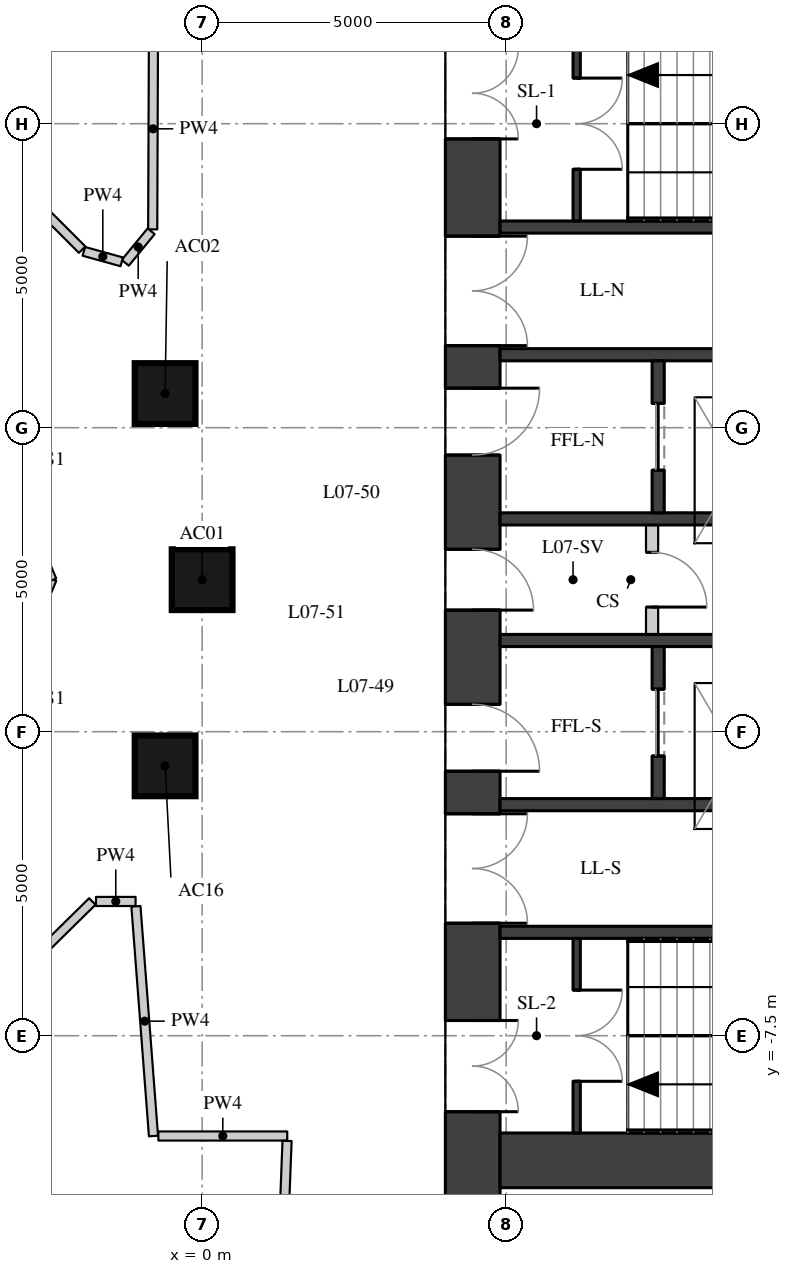
"""IFC4 building model, lengths in metres.
Left out: names, types, materials, properties, quantities, classifications, styles, units other than length and angle.
Written with IfcOpenShell. Run it as: python <this file> out.ifc"""

import sys

from ifc_helpers import new_model, si_unit, direction, frame, frame_2d, origin, origin_2d, place, context, subcontext, project, spatial, rectangle, extrude, element, fill, save


model = new_model("IFC4")
c1 = context("Model", 3, precision=1e-05, world=origin(), true_north=direction((0.0, 1.0)))
c2 = subcontext(c1, "Body", "Model", "MODEL_VIEW")
j1 = project(units=[si_unit("LENGTHUNIT", "METRE"), si_unit("PLANEANGLEUNIT", "RADIAN")], contexts=[c1])
p1 = place(None, origin())
s1 = spatial("IfcSite", under=j1, at=p1, CompositionType="ELEMENT")
p2 = place(p1, origin())
s2 = spatial("IfcBuilding", under=s1, at=p2, CompositionType="ELEMENT")
p3 = place(p2, frame((0.0, 0.0, 31.6)))
s3 = spatial("IfcBuildingStorey", under=s2, at=p3, CompositionType="ELEMENT", Elevation=31.6)
for number, where, z_axis, x_axis in (
    (1, (0.0, 0.0, 0.0), (0.0, 0.0, 1.0), (1.0, 0.0, 0.0)),
    (2, (-0.609, 3.062, 0.0), (0.0, 0.0, 1.0), (1.0, 0.0, 0.0)),
    (3, (-0.609, -3.062, 0.0), (0.0, 0.0, 1.0), (1.0, 0.0, 0.0)),
):
    element("IfcColumn", number, at=place(p3, frame(where, z_axis=z_axis, x_axis=x_axis)), inside=s3, PredefinedType="COLUMN", context=c2, shape_type="SweptSolid", body=[
        extrude(rectangle(XDim=1.0, YDim=1.0, at=origin_2d()), origin(), (0.0, 0.0, 1.0), 3.3),
    ])
p4 = place(p3, frame((4.45, -11.1, 0.0), z_axis=(0.0, 0.0, 1.0), x_axis=(0.0, 1.0, 0.0)))
e4 = element("IfcWall", 4, at=p4, inside=s3, PredefinedType="SHEAR", context=c2, shape_type="SweptSolid", body=[
    extrude(rectangle(XDim=22.2, YDim=0.9, at=frame_2d((11.1, 0.0))), origin(), (0.0, 0.0, 1.0), 3.02),
])
p5 = place(p4, frame((2.35, 0.0, 0.0)))
e5 = element("IfcOpeningElement", 5, at=p5, cuts=e4, PredefinedType="OPENING", context=c2, shape_type="SweptSolid", body=[
    extrude(rectangle(XDim=1.5, YDim=2.1, at=frame_2d((0.75, 1.05))), frame((0.0, 0.46, 0.0), z_axis=(0.0, -1.0, 0.0), x_axis=(1.0, 0.0, 0.0)), (0.0, 0.0, 1.0), 0.92),
])
p6 = place(p4, frame((5.45, 0.0, 0.0)))
e6 = element("IfcOpeningElement", 6, at=p6, cuts=e4, PredefinedType="OPENING", context=c2, shape_type="SweptSolid", body=[
    extrude(rectangle(XDim=1.8, YDim=2.1, at=frame_2d((0.9, 1.05))), frame((0.0, 0.46, 0.0), z_axis=(0.0, -1.0, 0.0), x_axis=(1.0, 0.0, 0.0)), (0.0, 0.0, 1.0), 0.92),
])
p7 = place(p4, frame((7.95, 0.0, 0.0)))
e7 = element("IfcOpeningElement", 7, at=p7, cuts=e4, PredefinedType="OPENING", context=c2, shape_type="SweptSolid", body=[
    extrude(rectangle(XDim=1.1, YDim=2.1, at=frame_2d((0.55, 1.05))), frame((0.0, 0.46, 0.0), z_axis=(0.0, -1.0, 0.0), x_axis=(1.0, 0.0, 0.0)), (0.0, 0.0, 1.0), 0.92),
])
p8 = place(p4, frame((10.6, 0.0, 0.0)))
e8 = element("IfcOpeningElement", 8, at=p8, cuts=e4, PredefinedType="OPENING", context=c2, shape_type="SweptSolid", body=[
    extrude(rectangle(XDim=1.0, YDim=2.1, at=frame_2d((0.5, 1.05))), frame((0.0, 0.46, 0.0), z_axis=(0.0, -1.0, 0.0), x_axis=(1.0, 0.0, 0.0)), (0.0, 0.0, 1.0), 0.92),
])
p9 = place(p4, frame((13.15, 0.0, 0.0)))
e9 = element("IfcOpeningElement", 9, at=p9, cuts=e4, PredefinedType="OPENING", context=c2, shape_type="SweptSolid", body=[
    extrude(rectangle(XDim=1.1, YDim=2.1, at=frame_2d((0.55, 1.05))), frame((0.0, 0.46, 0.0), z_axis=(0.0, -1.0, 0.0), x_axis=(1.0, 0.0, 0.0)), (0.0, 0.0, 1.0), 0.92),
])
p10 = place(p4, frame((14.95, 0.0, 0.0)))
e10 = element("IfcOpeningElement", 10, at=p10, cuts=e4, PredefinedType="OPENING", context=c2, shape_type="SweptSolid", body=[
    extrude(rectangle(XDim=1.8, YDim=2.1, at=frame_2d((0.9, 1.05))), frame((0.0, 0.46, 0.0), z_axis=(0.0, -1.0, 0.0), x_axis=(1.0, 0.0, 0.0)), (0.0, 0.0, 1.0), 0.92),
])
p11 = place(p4, frame((18.35, 0.0, 0.0)))
e11 = element("IfcOpeningElement", 11, at=p11, cuts=e4, PredefinedType="OPENING", context=c2, shape_type="SweptSolid", body=[
    extrude(rectangle(XDim=1.5, YDim=2.1, at=frame_2d((0.75, 1.05))), frame((0.0, 0.46, 0.0), z_axis=(0.0, -1.0, 0.0), x_axis=(1.0, 0.0, 0.0)), (0.0, 0.0, 1.0), 0.92),
])
p12 = place(p3, frame((4.9, -9.55, 0.0), z_axis=(0.0, 0.0, 1.0), x_axis=(1.0, 0.0, 0.0)))
e12 = element("IfcWall", 12, at=p12, inside=s3, PredefinedType="SHEAR", context=c2, shape_type="SweptSolid", body=[
    extrude(rectangle(XDim=10.2, YDim=0.9, at=frame_2d((5.1, 0.0))), origin(), (0.0, 0.0, 1.0), 3.02),
])
p13 = place(p3, frame((4.9, 5.8, 0.0), z_axis=(0.0, 0.0, 1.0), x_axis=(1.0, 0.0, 0.0)))
e13 = element("IfcWall", 13, at=p13, inside=s3, PredefinedType="SHEAR", context=c2, shape_type="SweptSolid", body=[
    extrude(rectangle(XDim=10.2, YDim=0.2, at=frame_2d((5.1, 0.0))), origin(), (0.0, 0.0, 1.0), 3.02),
])
p14 = place(p13, frame((6.75, 0.0, 0.0)))
e14 = element("IfcOpeningElement", 14, at=p14, cuts=e13, PredefinedType="OPENING", context=c2, shape_type="SweptSolid", body=[
    extrude(rectangle(XDim=1.1, YDim=2.1, at=frame_2d((0.55, 1.05))), frame((0.0, 0.11, 0.0), z_axis=(0.0, -1.0, 0.0), x_axis=(1.0, 0.0, 0.0)), (0.0, 0.0, 1.0), 0.22),
])
p15 = place(p13, frame((8.75, 0.0, 0.0)))
e15 = element("IfcOpeningElement", 15, at=p15, cuts=e13, PredefinedType="OPENING", context=c2, shape_type="SweptSolid", body=[
    extrude(rectangle(XDim=1.1, YDim=2.1, at=frame_2d((0.55, 1.05))), frame((0.0, 0.11, 0.0), z_axis=(0.0, -1.0, 0.0), x_axis=(1.0, 0.0, 0.0)), (0.0, 0.0, 1.0), 0.22),
])
p16 = place(p3, frame((4.9, 3.7, 0.0), z_axis=(0.0, 0.0, 1.0), x_axis=(1.0, 0.0, 0.0)))
e16 = element("IfcWall", 16, at=p16, inside=s3, PredefinedType="SHEAR", context=c2, shape_type="SweptSolid", body=[
    extrude(rectangle(XDim=10.2, YDim=0.2, at=frame_2d((5.1, 0.0))), origin(), (0.0, 0.0, 1.0), 3.02),
])
p17 = place(p16, frame((6.3, 0.0, 0.0)))
e17 = element("IfcOpeningElement", 17, at=p17, cuts=e16, PredefinedType="OPENING", context=c2, shape_type="SweptSolid", body=[
    extrude(rectangle(XDim=1.1, YDim=2.1, at=frame_2d((0.55, 1.05))), frame((0.0, 0.11, 0.0), z_axis=(0.0, -1.0, 0.0), x_axis=(1.0, 0.0, 0.0)), (0.0, 0.0, 1.0), 0.22),
])
p18 = place(p16, frame((8.6, 0.0, 0.0)))
e18 = element("IfcOpeningElement", 18, at=p18, cuts=e16, PredefinedType="OPENING", context=c2, shape_type="SweptSolid", body=[
    extrude(rectangle(XDim=1.1, YDim=2.1, at=frame_2d((0.55, 1.05))), frame((0.0, 0.11, 0.0), z_axis=(0.0, -1.0, 0.0), x_axis=(1.0, 0.0, 0.0)), (0.0, 0.0, 1.0), 0.22),
])
for number, where, z_axis, x_axis in (
    (19, (4.9, 1.0, 0.0), (0.0, 0.0, 1.0), (1.0, 0.0, 0.0)),
    (20, (4.9, -1.0, 0.0), (0.0, 0.0, 1.0), (1.0, 0.0, 0.0)),
):
    element("IfcWall", number, at=place(p3, frame(where, z_axis=z_axis, x_axis=x_axis)), inside=s3, PredefinedType="SHEAR", context=c2, shape_type="SweptSolid", body=[
        extrude(rectangle(XDim=10.2, YDim=0.2, at=frame_2d((5.1, 0.0))), origin(), (0.0, 0.0, 1.0), 3.02),
    ])
p19 = place(p3, frame((4.9, -3.7, 0.0), z_axis=(0.0, 0.0, 1.0), x_axis=(1.0, 0.0, 0.0)))
e21 = element("IfcWall", 21, at=p19, inside=s3, PredefinedType="SHEAR", context=c2, shape_type="SweptSolid", body=[
    extrude(rectangle(XDim=10.2, YDim=0.2, at=frame_2d((5.1, 0.0))), origin(), (0.0, 0.0, 1.0), 3.02),
])
p20 = place(p19, frame((6.3, 0.0, 0.0)))
e22 = element("IfcOpeningElement", 22, at=p20, cuts=e21, PredefinedType="OPENING", context=c2, shape_type="SweptSolid", body=[
    extrude(rectangle(XDim=1.1, YDim=2.1, at=frame_2d((0.55, 1.05))), frame((0.0, 0.11, 0.0), z_axis=(0.0, -1.0, 0.0), x_axis=(1.0, 0.0, 0.0)), (0.0, 0.0, 1.0), 0.22),
])
p21 = place(p19, frame((8.6, 0.0, 0.0)))
e23 = element("IfcOpeningElement", 23, at=p21, cuts=e21, PredefinedType="OPENING", context=c2, shape_type="SweptSolid", body=[
    extrude(rectangle(XDim=1.1, YDim=2.1, at=frame_2d((0.55, 1.05))), frame((0.0, 0.11, 0.0), z_axis=(0.0, -1.0, 0.0), x_axis=(1.0, 0.0, 0.0)), (0.0, 0.0, 1.0), 0.22),
])
p22 = place(p3, frame((4.9, -5.8, 0.0), z_axis=(0.0, 0.0, 1.0), x_axis=(1.0, 0.0, 0.0)))
e24 = element("IfcWall", 24, at=p22, inside=s3, PredefinedType="SHEAR", context=c2, shape_type="SweptSolid", body=[
    extrude(rectangle(XDim=10.2, YDim=0.2, at=frame_2d((5.1, 0.0))), origin(), (0.0, 0.0, 1.0), 3.02),
])
p23 = place(p3, frame((7.5, 1.1, 0.0), z_axis=(0.0, 0.0, 1.0), x_axis=(0.0, 1.0, 0.0)))
e25 = element("IfcWall", 25, at=p23, inside=s3, PredefinedType="SHEAR", context=c2, shape_type="SweptSolid", body=[
    extrude(rectangle(XDim=2.5, YDim=0.2, at=frame_2d((1.25, 0.0))), origin(), (0.0, 0.0, 1.0), 3.02),
])
p24 = place(p23, frame((0.7, 0.0, 0.0)))
e26 = element("IfcOpeningElement", 26, at=p24, cuts=e25, PredefinedType="OPENING", context=c2, shape_type="SweptSolid", body=[
    extrude(rectangle(XDim=1.1, YDim=2.1, at=frame_2d((0.55, 1.05))), frame((0.0, 0.11, 0.0), z_axis=(0.0, -1.0, 0.0), x_axis=(1.0, 0.0, 0.0)), (0.0, 0.0, 1.0), 0.22),
])
p25 = place(p3, frame((7.5, -3.6, 0.0), z_axis=(0.0, 0.0, 1.0), x_axis=(0.0, 1.0, 0.0)))
e27 = element("IfcWall", 27, at=p25, inside=s3, PredefinedType="SHEAR", context=c2, shape_type="SweptSolid", body=[
    extrude(rectangle(XDim=2.5, YDim=0.2, at=frame_2d((1.25, 0.0))), origin(), (0.0, 0.0, 1.0), 3.02),
])
p26 = place(p25, frame((0.7, 0.0, 0.0)))
e28 = element("IfcOpeningElement", 28, at=p26, cuts=e27, PredefinedType="OPENING", context=c2, shape_type="SweptSolid", body=[
    extrude(rectangle(XDim=1.1, YDim=2.1, at=frame_2d((0.55, 1.05))), frame((0.0, 0.11, 0.0), z_axis=(0.0, -1.0, 0.0), x_axis=(1.0, 0.0, 0.0)), (0.0, 0.0, 1.0), 0.22),
])
p27 = place(p3, frame((6.16, 5.9, 0.0), z_axis=(0.0, 0.0, 1.0), x_axis=(0.0, 1.0, 0.0)))
e29 = element("IfcWall", 29, at=p27, inside=s3, PredefinedType="SHEAR", context=c2, shape_type="SweptSolid", body=[
    extrude(rectangle(XDim=3.2, YDim=0.12, at=frame_2d((1.6, 0.0))), origin(), (0.0, 0.0, 1.0), 3.02),
])
p28 = place(p27, frame((0.85, 0.0, 0.0)))
e30 = element("IfcOpeningElement", 30, at=p28, cuts=e29, PredefinedType="OPENING", context=c2, shape_type="SweptSolid", body=[
    extrude(rectangle(XDim=1.5, YDim=2.1, at=frame_2d((0.75, 1.05))), frame((0.0, 0.07, 0.0), z_axis=(0.0, -1.0, 0.0), x_axis=(1.0, 0.0, 0.0)), (0.0, 0.0, 1.0), 0.14),
])
p29 = place(p3, frame((6.16, -9.1, 0.0), z_axis=(0.0, 0.0, 1.0), x_axis=(0.0, 1.0, 0.0)))
e31 = element("IfcWall", 31, at=p29, inside=s3, PredefinedType="SHEAR", context=c2, shape_type="SweptSolid", body=[
    extrude(rectangle(XDim=3.2, YDim=0.12, at=frame_2d((1.6, 0.0))), origin(), (0.0, 0.0, 1.0), 3.02),
])
p30 = place(p29, frame((0.85, 0.0, 0.0)))
e32 = element("IfcOpeningElement", 32, at=p30, cuts=e31, PredefinedType="OPENING", context=c2, shape_type="SweptSolid", body=[
    extrude(rectangle(XDim=1.5, YDim=2.1, at=frame_2d((0.75, 1.05))), frame((0.0, 0.07, 0.0), z_axis=(0.0, -1.0, 0.0), x_axis=(1.0, 0.0, 0.0)), (0.0, 0.0, 1.0), 0.14),
])
p31 = place(p3, frame((7.4, -0.9, 0.0), z_axis=(0.0, 0.0, 1.0), x_axis=(0.0, 1.0, 0.0)))
e33 = element("IfcWall", 33, at=p31, inside=s3, PredefinedType="PARTITIONING", context=c2, shape_type="SweptSolid", body=[
    extrude(rectangle(XDim=1.8, YDim=0.2, at=frame_2d((0.9, 0.0))), origin(), (0.0, 0.0, 1.0), 3.02),
])
p32 = place(p31, frame((0.45, 0.0, 0.0)))
e34 = element("IfcOpeningElement", 34, at=p32, cuts=e33, PredefinedType="OPENING", context=c2, shape_type="SweptSolid", body=[
    extrude(rectangle(XDim=0.9, YDim=2.1, at=frame_2d((0.45, 1.05))), frame((0.0, 0.11, 0.0), z_axis=(0.0, -1.0, 0.0), x_axis=(1.0, 0.0, 0.0)), (0.0, 0.0, 1.0), 0.22),
])
p33 = place(p3, frame((-0.8, 9.07, 0.0), z_axis=(0.0, 0.0, 1.0), x_axis=(-0.003911409193, -0.99999235041, 0.0)))
e35 = element("IfcWall", 35, at=p33, inside=s3, PredefinedType="PARTITIONING", context=c2, shape_type="SweptSolid", body=[
    extrude(rectangle(XDim=3.308, YDim=0.15, at=frame_2d((1.654, 0.0))), origin(), (0.0, 0.0, 1.0), 3.02),
])
p34 = place(p3, frame((-0.838, 5.731, 0.0), z_axis=(0.0, 0.0, 1.0), x_axis=(-0.634227442266, -0.773146526524, 0.0)))
e36 = element("IfcWall", 36, at=p34, inside=s3, PredefinedType="PARTITIONING", context=c2, shape_type="SweptSolid", body=[
    extrude(rectangle(XDim=0.671, YDim=0.15, at=frame_2d((0.336, 0.0))), origin(), (0.0, 0.0, 1.0), 3.02),
])
p35 = place(p3, frame((-1.322, 5.228, 0.0), z_axis=(0.0, 0.0, 1.0), x_axis=(-0.963895729021, 0.266279972163, 0.0)))
e37 = element("IfcWall", 37, at=p35, inside=s3, PredefinedType="PARTITIONING", context=c2, shape_type="SweptSolid", body=[
    extrude(rectangle(XDim=0.646, YDim=0.15, at=frame_2d((0.323, 0.0))), origin(), (0.0, 0.0, 1.0), 3.02),
])
p36 = place(p3, frame((-1.973, 5.428, 0.0), z_axis=(0.0, 0.0, 1.0), x_axis=(-0.707106781187, 0.707106781187, 0.0)))
e38 = element("IfcWall", 38, at=p36, inside=s3, PredefinedType="PARTITIONING", context=c2, shape_type="SweptSolid", body=[
    extrude(rectangle(XDim=2.593, YDim=0.15, at=frame_2d((1.297, 0.0))), origin(), (0.0, 0.0, 1.0), 3.02),
])
p37 = place(p3, frame((-3.779, -7.234, 0.0), z_axis=(0.0, 0.0, 1.0), x_axis=(0.712684144815, 0.701485074487, 0.0)))
e39 = element("IfcWall", 39, at=p37, inside=s3, PredefinedType="PARTITIONING", context=c2, shape_type="SweptSolid", body=[
    extrude(rectangle(XDim=2.769, YDim=0.15, at=frame_2d((1.384, 0.0))), origin(), (0.0, 0.0, 1.0), 3.02),
])
p38 = place(p3, frame((-1.746, -5.292, 0.0), z_axis=(0.0, 0.0, 1.0), x_axis=(1.0, 0.0, 0.0)))
e40 = element("IfcWall", 40, at=p38, inside=s3, PredefinedType="PARTITIONING", context=c2, shape_type="SweptSolid", body=[
    extrude(rectangle(XDim=0.651, YDim=0.15, at=frame_2d((0.326, 0.0))), origin(), (0.0, 0.0, 1.0), 3.02),
])
p39 = place(p3, frame((-1.089, -5.372, 0.0), z_axis=(0.0, 0.0, 1.0), x_axis=(0.076169209517, -0.997094905975, 0.0)))
e41 = element("IfcWall", 41, at=p39, inside=s3, PredefinedType="PARTITIONING", context=c2, shape_type="SweptSolid", body=[
    extrude(rectangle(XDim=3.789, YDim=0.15, at=frame_2d((1.894, 0.0))), origin(), (0.0, 0.0, 1.0), 3.02),
])
p40 = place(p3, frame((-0.72, -9.15, 0.0), z_axis=(0.0, 0.0, 1.0), x_axis=(1.0, 0.0, 0.0)))
e42 = element("IfcWall", 42, at=p40, inside=s3, PredefinedType="PARTITIONING", context=c2, shape_type="SweptSolid", body=[
    extrude(rectangle(XDim=2.12, YDim=0.15, at=frame_2d((1.06, 0.0))), origin(), (0.0, 0.0, 1.0), 3.02),
])
p41 = place(p3, frame((1.397, -9.23, 0.0), z_axis=(0.0, 0.0, 1.0), x_axis=(-0.038741742932, -0.99924925687, 0.0)))
e43 = element("IfcWall", 43, at=p41, inside=s3, PredefinedType="PARTITIONING", context=c2, shape_type="SweptSolid", body=[
    extrude(rectangle(XDim=4.922, YDim=0.15, at=frame_2d((2.461, 0.0))), origin(), (0.0, 0.0, 1.0), 3.02),
])
for number, where, z_axis, x_axis in (
    (44, (-2.446, 0.0, 0.0), (0.0, 0.0, 1.0), (-0.383, -0.924, 0.0)),
    (45, (-4.073, 3.927, 0.0), (0.0, 0.0, 1.0), (0.383, -0.924, 0.0)),
):
    element("IfcWall", number, at=place(p3, frame(where, z_axis=z_axis, x_axis=x_axis)), inside=s3, PredefinedType="PARTITIONING", context=c2, shape_type="SweptSolid", body=[
        extrude(rectangle(XDim=4.251, YDim=0.1, at=frame_2d((2.125, 0.0))), origin(), (0.0, 0.0, 1.0), 3.02),
    ])
p42 = place(p5, origin())
e46 = element("IfcDoor", 46, at=p42, inside=s3, OperationType="DOUBLE_DOOR_SINGLE_SWING", PredefinedType="DOOR", context=c2, shape_type="SweptSolid", body=[
    extrude(rectangle(XDim=1.5, YDim=2.1, at=frame_2d((0.75, 1.05))), frame((0.0, 0.025, 0.0), z_axis=(0.0, -1.0, 0.0), x_axis=(1.0, 0.0, 0.0)), (0.0, 0.0, 1.0), 0.05),
])
fill(e5, e46)
p43 = place(p6, origin())
e47 = element("IfcDoor", 47, at=p43, inside=s3, OperationType="DOUBLE_DOOR_SINGLE_SWING", PredefinedType="DOOR", context=c2, shape_type="SweptSolid", body=[
    extrude(rectangle(XDim=1.8, YDim=2.1, at=frame_2d((0.9, 1.05))), frame((0.0, 0.025, 0.0), z_axis=(0.0, -1.0, 0.0), x_axis=(1.0, 0.0, 0.0)), (0.0, 0.0, 1.0), 0.05),
])
fill(e6, e47)
p44 = place(p7, origin())
e48 = element("IfcDoor", 48, at=p44, inside=s3, OperationType="SINGLE_SWING_RIGHT", PredefinedType="DOOR", context=c2, shape_type="SweptSolid", body=[
    extrude(rectangle(XDim=1.1, YDim=2.1, at=frame_2d((0.55, 1.05))), frame((0.0, 0.025, 0.0), z_axis=(0.0, -1.0, 0.0), x_axis=(1.0, 0.0, 0.0)), (0.0, 0.0, 1.0), 0.05),
])
fill(e7, e48)
p45 = place(p8, origin())
e49 = element("IfcDoor", 49, at=p45, inside=s3, OperationType="SINGLE_SWING_RIGHT", PredefinedType="DOOR", context=c2, shape_type="SweptSolid", body=[
    extrude(rectangle(XDim=1.0, YDim=2.1, at=frame_2d((0.5, 1.05))), frame((0.0, 0.025, 0.0), z_axis=(0.0, -1.0, 0.0), x_axis=(1.0, 0.0, 0.0)), (0.0, 0.0, 1.0), 0.05),
])
fill(e8, e49)
p46 = place(p9, origin())
e50 = element("IfcDoor", 50, at=p46, inside=s3, OperationType="SINGLE_SWING_LEFT", PredefinedType="DOOR", context=c2, shape_type="SweptSolid", body=[
    extrude(rectangle(XDim=1.1, YDim=2.1, at=frame_2d((0.55, 1.05))), frame((0.0, 0.025, 0.0), z_axis=(0.0, -1.0, 0.0), x_axis=(1.0, 0.0, 0.0)), (0.0, 0.0, 1.0), 0.05),
])
fill(e9, e50)
p47 = place(p10, origin())
e51 = element("IfcDoor", 51, at=p47, inside=s3, OperationType="DOUBLE_DOOR_SINGLE_SWING", PredefinedType="DOOR", context=c2, shape_type="SweptSolid", body=[
    extrude(rectangle(XDim=1.8, YDim=2.1, at=frame_2d((0.9, 1.05))), frame((0.0, 0.025, 0.0), z_axis=(0.0, -1.0, 0.0), x_axis=(1.0, 0.0, 0.0)), (0.0, 0.0, 1.0), 0.05),
])
fill(e10, e51)
p48 = place(p11, origin())
e52 = element("IfcDoor", 52, at=p48, inside=s3, OperationType="DOUBLE_DOOR_SINGLE_SWING", PredefinedType="DOOR", context=c2, shape_type="SweptSolid", body=[
    extrude(rectangle(XDim=1.5, YDim=2.1, at=frame_2d((0.75, 1.05))), frame((0.0, 0.025, 0.0), z_axis=(0.0, -1.0, 0.0), x_axis=(1.0, 0.0, 0.0)), (0.0, 0.0, 1.0), 0.05),
])
fill(e11, e52)
p49 = place(p28, origin())
e53 = element("IfcDoor", 53, at=p49, inside=s3, OperationType="DOUBLE_DOOR_SINGLE_SWING", PredefinedType="DOOR", context=c2, shape_type="SweptSolid", body=[
    extrude(rectangle(XDim=1.5, YDim=2.1, at=frame_2d((0.75, 1.05))), frame((0.0, 0.025, 0.0), z_axis=(0.0, -1.0, 0.0), x_axis=(1.0, 0.0, 0.0)), (0.0, 0.0, 1.0), 0.05),
])
fill(e30, e53)
p50 = place(p30, origin())
e54 = element("IfcDoor", 54, at=p50, inside=s3, OperationType="DOUBLE_DOOR_SINGLE_SWING", PredefinedType="DOOR", context=c2, shape_type="SweptSolid", body=[
    extrude(rectangle(XDim=1.5, YDim=2.1, at=frame_2d((0.75, 1.05))), frame((0.0, 0.025, 0.0), z_axis=(0.0, -1.0, 0.0), x_axis=(1.0, 0.0, 0.0)), (0.0, 0.0, 1.0), 0.05),
])
fill(e32, e54)
p51 = place(p24, origin())
e55 = element("IfcDoor", 55, at=p51, inside=s3, OperationType="DOUBLE_DOOR_SLIDING", PredefinedType="DOOR", context=c2, shape_type="SweptSolid", body=[
    extrude(rectangle(XDim=1.1, YDim=2.1, at=frame_2d((0.55, 1.05))), frame((0.0, 0.025, 0.0), z_axis=(0.0, -1.0, 0.0), x_axis=(1.0, 0.0, 0.0)), (0.0, 0.0, 1.0), 0.05),
])
fill(e26, e55)
p52 = place(p26, origin())
e56 = element("IfcDoor", 56, at=p52, inside=s3, OperationType="DOUBLE_DOOR_SLIDING", PredefinedType="DOOR", context=c2, shape_type="SweptSolid", body=[
    extrude(rectangle(XDim=1.1, YDim=2.1, at=frame_2d((0.55, 1.05))), frame((0.0, 0.025, 0.0), z_axis=(0.0, -1.0, 0.0), x_axis=(1.0, 0.0, 0.0)), (0.0, 0.0, 1.0), 0.05),
])
fill(e28, e56)
p53 = place(p32, origin())
e57 = element("IfcDoor", 57, at=p53, inside=s3, OperationType="SINGLE_SWING_RIGHT", PredefinedType="DOOR", context=c2, shape_type="SweptSolid", body=[
    extrude(rectangle(XDim=0.9, YDim=2.1, at=frame_2d((0.45, 1.05))), frame((0.0, 0.025, 0.0), z_axis=(0.0, -1.0, 0.0), x_axis=(1.0, 0.0, 0.0)), (0.0, 0.0, 1.0), 0.05),
])
fill(e34, e57)
save(model, sys.argv[1])
